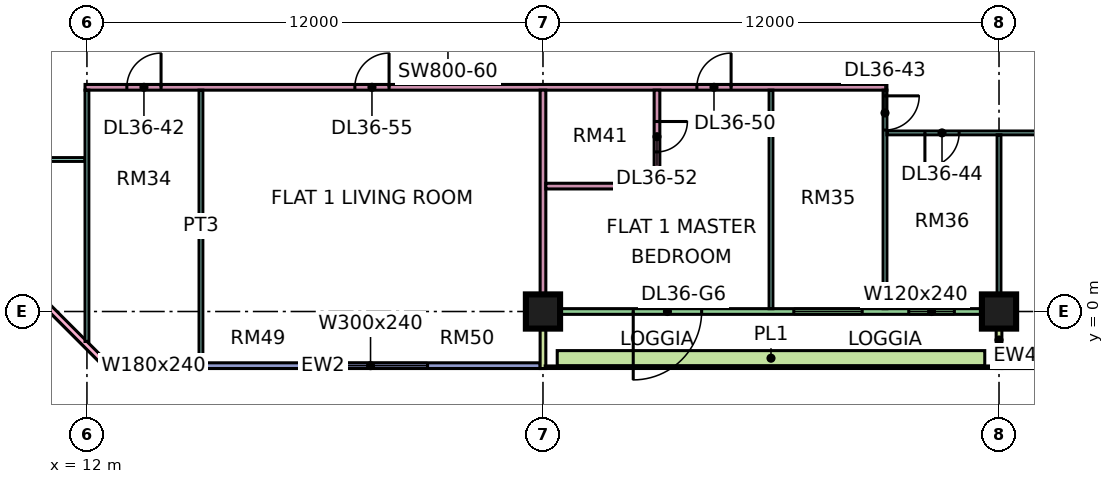
"""IFC4 building model, lengths in metres.
Left out: names, types, materials, properties, quantities, classifications, styles, units other than length and angle.
Written with IfcOpenShell. Run it as: python <this file> out.ifc"""

import sys

from ifc_helpers import new_model, si_unit, direction, frame, frame_2d, origin, origin_2d, place, context, subcontext, project, spatial, rectangle, extrude, element, fill, save


model = new_model("IFC4")
c1 = context("Model", 3, precision=1e-05, world=origin(), true_north=direction((0.0, 1.0)))
c2 = subcontext(c1, "Body", "Model", "MODEL_VIEW")
j1 = project(units=[si_unit("LENGTHUNIT", "METRE"), si_unit("PLANEANGLEUNIT", "RADIAN")], contexts=[c1])
p1 = place(None, origin())
s1 = spatial("IfcSite", under=j1, at=p1, CompositionType="ELEMENT")
p2 = place(p1, origin())
s2 = spatial("IfcBuilding", under=s1, at=p2, CompositionType="ELEMENT")
p3 = place(p2, frame((0.0, 0.0, 161.15)))
s3 = spatial("IfcBuildingStorey", under=s2, at=p3, CompositionType="ELEMENT", Elevation=161.15)
for number, where, z_axis, x_axis in (
    (1, (24.0, 0.0, 0.0), (0.0, 0.0, 1.0), (1.0, 0.0, 0.0)),
    (2, (36.0, 0.0, 0.0), (0.0, 0.0, 1.0), (1.0, 0.0, 0.0)),
):
    element("IfcColumn", number, at=place(p3, frame(where, z_axis=z_axis, x_axis=x_axis)), inside=s3, PredefinedType="COLUMN", context=c2, shape_type="SweptSolid", body=[
        extrude(rectangle(XDim=0.9, YDim=0.9, at=origin_2d()), origin(), (0.0, 0.0, 1.0), 3.75),
    ])
p4 = place(p3, frame((-1.447, 12.553, 0.0), z_axis=(0.0, 0.0, 1.0), x_axis=(0.707106781187, -0.707106781187, 0.0)))
e3 = element("IfcWall", 3, at=p4, inside=s3, PredefinedType="SOLIDWALL", context=c2, shape_type="SweptSolid", body=[
    extrude(rectangle(XDim=19.799, YDim=0.15, at=frame_2d((9.899, 0.0))), origin(), (0.0, 0.0, 1.0), 3.35),
])
p5 = place(p4, frame((2.212, 0.0, 0.45)))
e4 = element("IfcOpeningElement", 4, at=p5, cuts=e3, PredefinedType="OPENING", context=c2, shape_type="SweptSolid", body=[
    extrude(rectangle(XDim=3.0, YDim=2.4, at=frame_2d((1.5, 1.2))), frame((0.0, 0.085, 0.0), z_axis=(0.0, -1.0, 0.0), x_axis=(1.0, 0.0, 0.0)), (0.0, 0.0, 1.0), 0.17),
])
p6 = place(p4, frame((10.216, 0.0, 0.45)))
e5 = element("IfcOpeningElement", 5, at=p6, cuts=e3, PredefinedType="OPENING", context=c2, shape_type="SweptSolid", body=[
    extrude(rectangle(XDim=3.0, YDim=2.4, at=frame_2d((1.5, 1.2))), frame((0.0, 0.085, 0.0), z_axis=(0.0, -1.0, 0.0), x_axis=(1.0, 0.0, 0.0)), (0.0, 0.0, 1.0), 0.17),
])
p7 = place(p3, frame((12.5, -1.425, 0.0), z_axis=(0.0, 0.0, 1.0), x_axis=(1.0, 0.0, 0.0)))
e6 = element("IfcWall", 6, at=p7, inside=s3, PredefinedType="SOLIDWALL", context=c2, shape_type="SweptSolid", body=[
    extrude(rectangle(XDim=11.425, YDim=0.15, at=frame_2d((5.712, 0.0))), origin(), (0.0, 0.0, 1.0), 3.35),
])
p8 = place(p7, frame((0.35, 0.0, 0.45)))
e7 = element("IfcOpeningElement", 7, at=p8, cuts=e6, PredefinedType="OPENING", context=c2, shape_type="SweptSolid", body=[
    extrude(rectangle(XDim=1.8, YDim=2.4, at=frame_2d((0.9, 1.2))), frame((0.0, 0.085, 0.0), z_axis=(0.0, -1.0, 0.0), x_axis=(1.0, 0.0, 0.0)), (0.0, 0.0, 1.0), 0.17),
])
p9 = place(p7, frame((5.462, 0.0, 0.45)))
e8 = element("IfcOpeningElement", 8, at=p9, cuts=e6, PredefinedType="OPENING", context=c2, shape_type="SweptSolid", body=[
    extrude(rectangle(XDim=3.0, YDim=2.4, at=frame_2d((1.5, 1.2))), frame((0.0, 0.085, 0.0), z_axis=(0.0, -1.0, 0.0), x_axis=(1.0, 0.0, 0.0)), (0.0, 0.0, 1.0), 0.17),
])
p10 = place(p3, frame((24.075, 0.0, 0.0), z_axis=(0.0, 0.0, 1.0), x_axis=(1.0, 0.0, 0.0)))
e9 = element("IfcWall", 9, at=p10, inside=s3, PredefinedType="SOLIDWALL", context=c2, shape_type="SweptSolid", body=[
    extrude(rectangle(XDim=11.85, YDim=0.15, at=frame_2d((5.925, 0.0))), origin(), (0.0, 0.0, 1.0), 3.35),
])
p11 = place(p10, frame((2.3, 0.0, 0.0)))
e10 = element("IfcOpeningElement", 10, at=p11, cuts=e9, PredefinedType="OPENING", context=c2, shape_type="SweptSolid", body=[
    extrude(rectangle(XDim=1.8, YDim=2.4, at=frame_2d((0.9, 1.2))), frame((0.0, 0.085, 0.0), z_axis=(0.0, -1.0, 0.0), x_axis=(1.0, 0.0, 0.0)), (0.0, 0.0, 1.0), 0.17),
])
p12 = place(p10, frame((6.525, 0.0, 0.45)))
e11 = element("IfcOpeningElement", 11, at=p12, cuts=e9, PredefinedType="OPENING", context=c2, shape_type="SweptSolid", body=[
    extrude(rectangle(XDim=1.8, YDim=2.4, at=frame_2d((0.9, 1.2))), frame((0.0, 0.085, 0.0), z_axis=(0.0, -1.0, 0.0), x_axis=(1.0, 0.0, 0.0)), (0.0, 0.0, 1.0), 0.17),
])
p13 = place(p10, frame((9.55, 0.0, 0.45)))
e12 = element("IfcOpeningElement", 12, at=p13, cuts=e9, PredefinedType="OPENING", context=c2, shape_type="SweptSolid", body=[
    extrude(rectangle(XDim=1.2, YDim=2.4, at=frame_2d((0.6, 1.2))), frame((0.0, 0.085, 0.0), z_axis=(0.0, -1.0, 0.0), x_axis=(1.0, 0.0, 0.0)), (0.0, 0.0, 1.0), 0.17),
])
for number, where, z_axis, x_axis in (
    (13, (24.0, -1.5, 0.0), (0.0, 0.0, 1.0), (0.0, 1.0, 0.0)),
    (14, (36.0, -1.5, 0.0), (0.0, 0.0, 1.0), (0.0, 1.0, 0.0)),
):
    element("IfcWall", number, at=place(p3, frame(where, z_axis=z_axis, x_axis=x_axis)), inside=s3, PredefinedType="SOLIDWALL", context=c2, shape_type="SweptSolid", body=[
        extrude(rectangle(XDim=1.5, YDim=0.15, at=frame_2d((0.75, 0.0))), origin(), (0.0, 0.0, 1.0), 3.35),
    ])
p14 = place(p3, frame((36.075, -1.425, 0.0), z_axis=(0.0, 0.0, 1.0), x_axis=(1.0, 0.0, 0.0)))
e15 = element("IfcWall", 15, at=p14, inside=s3, PredefinedType="SOLIDWALL", context=c2, shape_type="SweptSolid", body=[
    extrude(rectangle(XDim=11.85, YDim=0.15, at=frame_2d((5.925, 0.0))), origin(), (0.0, 0.0, 1.0), 3.35),
])
p15 = place(p14, frame((2.962, 0.0, 0.45)))
e16 = element("IfcOpeningElement", 16, at=p15, cuts=e15, PredefinedType="OPENING", context=c2, shape_type="SweptSolid", body=[
    extrude(rectangle(XDim=3.0, YDim=2.4, at=frame_2d((1.5, 1.2))), frame((0.0, 0.085, 0.0), z_axis=(0.0, -1.0, 0.0), x_axis=(1.0, 0.0, 0.0)), (0.0, 0.0, 1.0), 0.17),
])
p16 = place(p14, frame((9.488, 0.0, 0.45)))
e17 = element("IfcOpeningElement", 17, at=p16, cuts=e15, PredefinedType="OPENING", context=c2, shape_type="SweptSolid", body=[
    extrude(rectangle(XDim=1.8, YDim=2.4, at=frame_2d((0.9, 1.2))), frame((0.0, 0.085, 0.0), z_axis=(0.0, -1.0, 0.0), x_axis=(1.0, 0.0, 0.0)), (0.0, 0.0, 1.0), 0.17),
])
p17 = place(p3, frame((24.375, -1.229, 0.0), z_axis=(0.0, 0.0, 1.0), x_axis=(1.0, 0.0, 0.0)))
e18 = element("IfcWall", 18, at=p17, inside=s3, PredefinedType="SOLIDWALL", context=c2, shape_type="SweptSolid", body=[
    extrude(rectangle(XDim=11.25, YDim=0.4, at=frame_2d((5.625, 0.0))), origin(), (0.0, 0.0, 1.0), 0.7),
])
p18 = place(p3, frame((9.05, 4.0, 0.0), z_axis=(0.0, 0.0, 1.0), x_axis=(1.0, 0.0, 0.0)))
e19 = element("IfcWall", 19, at=p18, inside=s3, PredefinedType="PARTITIONING", context=c2, shape_type="SweptSolid", body=[
    extrude(rectangle(XDim=2.9, YDim=0.1, at=frame_2d((1.45, 0.0))), origin(), (0.0, 0.0, 1.0), 3.35),
])
p19 = place(p3, frame((11.95, 5.9, 0.0), z_axis=(0.0, 0.0, 1.0), x_axis=(1.0, 0.0, 0.0)))
e20 = element("IfcWall", 20, at=p19, inside=s3, PredefinedType="PARTITIONING", context=c2, shape_type="SweptSolid", body=[
    extrude(rectangle(XDim=21.1, YDim=0.15, at=frame_2d((10.55, 0.0))), origin(), (0.0, 0.0, 1.0), 3.35),
])
p20 = place(p19, frame((1.1, 0.0, 0.0)))
e21 = element("IfcOpeningElement", 21, at=p20, cuts=e20, PredefinedType="OPENING", context=c2, shape_type="SweptSolid", body=[
    extrude(rectangle(XDim=0.9, YDim=2.1, at=frame_2d((0.45, 1.05))), frame((0.0, 0.085, 0.0), z_axis=(0.0, -1.0, 0.0), x_axis=(1.0, 0.0, 0.0)), (0.0, 0.0, 1.0), 0.17),
])
p21 = place(p19, frame((16.1, 0.0, 0.0)))
e22 = element("IfcOpeningElement", 22, at=p21, cuts=e20, PredefinedType="OPENING", context=c2, shape_type="SweptSolid", body=[
    extrude(rectangle(XDim=0.9, YDim=2.1, at=frame_2d((0.45, 1.05))), frame((0.0, 0.085, 0.0), z_axis=(0.0, -1.0, 0.0), x_axis=(1.0, 0.0, 0.0)), (0.0, 0.0, 1.0), 0.17),
])
p22 = place(p19, frame((7.1, 0.0, 0.0)))
e23 = element("IfcOpeningElement", 23, at=p22, cuts=e20, PredefinedType="OPENING", context=c2, shape_type="SweptSolid", body=[
    extrude(rectangle(XDim=0.9, YDim=2.1, at=frame_2d((0.45, 1.05))), frame((0.0, 0.085, 0.0), z_axis=(0.0, -1.0, 0.0), x_axis=(1.0, 0.0, 0.0)), (0.0, 0.0, 1.0), 0.17),
])
p23 = place(p3, frame((12.0, -0.788, 0.0), z_axis=(0.0, 0.0, 1.0), x_axis=(0.0, 1.0, 0.0)))
e24 = element("IfcWall", 24, at=p23, inside=s3, PredefinedType="PARTITIONING", context=c2, shape_type="SweptSolid", body=[
    extrude(rectangle(XDim=6.613, YDim=0.1, at=frame_2d((3.306, 0.0))), origin(), (0.0, 0.0, 1.0), 3.35),
])
p24 = place(p3, frame((15.0, -1.35, 0.0), z_axis=(0.0, 0.0, 1.0), x_axis=(0.0, 1.0, 0.0)))
e25 = element("IfcWall", 25, at=p24, inside=s3, PredefinedType="PARTITIONING", context=c2, shape_type="SweptSolid", body=[
    extrude(rectangle(XDim=7.175, YDim=0.1, at=frame_2d((3.587, 0.0))), origin(), (0.0, 0.0, 1.0), 3.35),
])
p25 = place(p3, frame((24.0, 0.0, 0.0), z_axis=(0.0, 0.0, 1.0), x_axis=(0.0, 1.0, 0.0)))
e26 = element("IfcWall", 26, at=p25, inside=s3, PredefinedType="PARTITIONING", context=c2, shape_type="SweptSolid", body=[
    extrude(rectangle(XDim=5.825, YDim=0.15, at=frame_2d((2.913, 0.0))), origin(), (0.0, 0.0, 1.0), 3.35),
])
p26 = place(p3, frame((24.075, 3.3, 0.0), z_axis=(0.0, 0.0, 1.0), x_axis=(1.0, 0.0, 0.0)))
e27 = element("IfcWall", 27, at=p26, inside=s3, PredefinedType="PARTITIONING", context=c2, shape_type="SweptSolid", body=[
    extrude(rectangle(XDim=3.0, YDim=0.15, at=frame_2d((1.5, 0.0))), origin(), (0.0, 0.0, 1.0), 3.35),
])
p27 = place(p3, frame((27.0, 3.375, 0.0), z_axis=(0.0, 0.0, 1.0), x_axis=(0.0, 1.0, 0.0)))
e28 = element("IfcWall", 28, at=p27, inside=s3, PredefinedType="PARTITIONING", context=c2, shape_type="SweptSolid", body=[
    extrude(rectangle(XDim=2.45, YDim=0.15, at=frame_2d((1.225, 0.0))), origin(), (0.0, 0.0, 1.0), 3.35),
])
p28 = place(p27, frame((0.825, 0.0, 0.0)))
e29 = element("IfcOpeningElement", 29, at=p28, cuts=e28, PredefinedType="OPENING", context=c2, shape_type="SweptSolid", body=[
    extrude(rectangle(XDim=0.8, YDim=2.1, at=frame_2d((0.4, 1.05))), frame((0.0, 0.085, 0.0), z_axis=(0.0, -1.0, 0.0), x_axis=(1.0, 0.0, 0.0)), (0.0, 0.0, 1.0), 0.17),
])
p29 = place(p3, frame((30.0, 0.074, 0.0), z_axis=(0.0, 0.0, 1.0), x_axis=(0.0, 1.0, 0.0)))
e30 = element("IfcWall", 30, at=p29, inside=s3, PredefinedType="PARTITIONING", context=c2, shape_type="SweptSolid", body=[
    extrude(rectangle(XDim=5.751, YDim=0.1, at=frame_2d((2.875, 0.0))), origin(), (0.0, 0.0, 1.0), 3.35),
])
p30 = place(p3, frame((33.0, 0.074, 0.0), z_axis=(0.0, 0.0, 1.0), x_axis=(0.0, 1.0, 0.0)))
e31 = element("IfcWall", 31, at=p30, inside=s3, PredefinedType="PARTITIONING", context=c2, shape_type="SweptSolid", body=[
    extrude(rectangle(XDim=5.751, YDim=0.1, at=frame_2d((2.875, 0.0))), origin(), (0.0, 0.0, 1.0), 3.35),
])
p31 = place(p30, frame((4.701, 0.0, 0.0)))
e32 = element("IfcOpeningElement", 32, at=p31, cuts=e31, PredefinedType="OPENING", context=c2, shape_type="SweptSolid", body=[
    extrude(rectangle(XDim=0.9, YDim=2.1, at=frame_2d((0.45, 1.05))), frame((0.0, 0.06, 0.0), z_axis=(0.0, -1.0, 0.0), x_axis=(1.0, 0.0, 0.0)), (0.0, 0.0, 1.0), 0.12),
])
p32 = place(p3, frame((33.05, 4.7, 0.0), z_axis=(0.0, 0.0, 1.0), x_axis=(1.0, 0.0, 0.0)))
e33 = element("IfcWall", 33, at=p32, inside=s3, PredefinedType="PARTITIONING", context=c2, shape_type="SweptSolid", body=[
    extrude(rectangle(XDim=20.85, YDim=0.1, at=frame_2d((10.425, 0.0))), origin(), (0.0, 0.0, 1.0), 3.35),
])
p33 = place(p32, frame((1.0, 0.0, 0.0)))
e34 = element("IfcOpeningElement", 34, at=p33, cuts=e33, PredefinedType="OPENING", context=c2, shape_type="SweptSolid", body=[
    extrude(rectangle(XDim=0.9, YDim=2.1, at=frame_2d((0.45, 1.05))), frame((0.0, 0.06, 0.0), z_axis=(0.0, -1.0, 0.0), x_axis=(1.0, 0.0, 0.0)), (0.0, 0.0, 1.0), 0.12),
])
p34 = place(p32, frame((13.0, 0.0, 0.0)))
e35 = element("IfcOpeningElement", 35, at=p34, cuts=e33, PredefinedType="OPENING", context=c2, shape_type="SweptSolid", body=[
    extrude(rectangle(XDim=0.9, YDim=2.1, at=frame_2d((0.45, 1.05))), frame((0.0, 0.06, 0.0), z_axis=(0.0, -1.0, 0.0), x_axis=(1.0, 0.0, 0.0)), (0.0, 0.0, 1.0), 0.12),
])
p35 = place(p32, frame((16.0, 0.0, 0.0)))
e36 = element("IfcOpeningElement", 36, at=p35, cuts=e33, PredefinedType="OPENING", context=c2, shape_type="SweptSolid", body=[
    extrude(rectangle(XDim=0.9, YDim=2.1, at=frame_2d((0.45, 1.05))), frame((0.0, 0.06, 0.0), z_axis=(0.0, -1.0, 0.0), x_axis=(1.0, 0.0, 0.0)), (0.0, 0.0, 1.0), 0.12),
])
p36 = place(p32, frame((19.0, 0.0, 0.0)))
e37 = element("IfcOpeningElement", 37, at=p36, cuts=e33, PredefinedType="OPENING", context=c2, shape_type="SweptSolid", body=[
    extrude(rectangle(XDim=0.9, YDim=2.1, at=frame_2d((0.45, 1.05))), frame((0.0, 0.06, 0.0), z_axis=(0.0, -1.0, 0.0), x_axis=(1.0, 0.0, 0.0)), (0.0, 0.0, 1.0), 0.12),
])
p37 = place(p32, frame((7.0, 0.0, 0.0)))
e38 = element("IfcOpeningElement", 38, at=p37, cuts=e33, PredefinedType="OPENING", context=c2, shape_type="SweptSolid", body=[
    extrude(rectangle(XDim=0.9, YDim=2.1, at=frame_2d((0.45, 1.05))), frame((0.0, 0.06, 0.0), z_axis=(0.0, -1.0, 0.0), x_axis=(1.0, 0.0, 0.0)), (0.0, 0.0, 1.0), 0.12),
])
p38 = place(p3, frame((36.0, 0.0, 0.0), z_axis=(0.0, 0.0, 1.0), x_axis=(0.0, 1.0, 0.0)))
e39 = element("IfcWall", 39, at=p38, inside=s3, PredefinedType="PARTITIONING", context=c2, shape_type="SweptSolid", body=[
    extrude(rectangle(XDim=4.65, YDim=0.1, at=frame_2d((2.325, 0.0))), origin(), (0.0, 0.0, 1.0), 3.35),
])
p39 = place(p8, origin())
e40 = element("IfcWindow", 40, at=p39, inside=s3, PartitioningType="SINGLE_PANEL", PredefinedType="WINDOW", context=c2, shape_type="SweptSolid", body=[
    extrude(rectangle(XDim=1.8, YDim=2.4, at=frame_2d((0.9, 1.2))), frame((0.0, 0.03, 0.0), z_axis=(0.0, -1.0, 0.0), x_axis=(1.0, 0.0, 0.0)), (0.0, 0.0, 1.0), 0.06),
])
fill(e7, e40)
p40 = place(p9, origin())
e41 = element("IfcWindow", 41, at=p40, inside=s3, PartitioningType="SINGLE_PANEL", PredefinedType="WINDOW", context=c2, shape_type="SweptSolid", body=[
    extrude(rectangle(XDim=3.0, YDim=2.4, at=frame_2d((1.5, 1.2))), frame((0.0, 0.03, 0.0), z_axis=(0.0, -1.0, 0.0), x_axis=(1.0, 0.0, 0.0)), (0.0, 0.0, 1.0), 0.06),
])
fill(e8, e41)
p41 = place(p11, frame((1.8, 0.0, 0.0), z_axis=(0.0, 0.0, 1.0), x_axis=(-1.0, 0.0, 0.0)))
e42 = element("IfcDoor", 42, at=p41, inside=s3, OperationType="DOUBLE_DOOR_SINGLE_SWING", PredefinedType="DOOR", context=c2, shape_type="SweptSolid", body=[
    extrude(rectangle(XDim=1.8, YDim=2.4, at=frame_2d((0.9, 1.2))), frame((0.0, 0.025, 0.0), z_axis=(0.0, -1.0, 0.0), x_axis=(1.0, 0.0, 0.0)), (0.0, 0.0, 1.0), 0.05),
])
fill(e10, e42)
p42 = place(p12, origin())
e43 = element("IfcWindow", 43, at=p42, inside=s3, PartitioningType="SINGLE_PANEL", PredefinedType="WINDOW", context=c2, shape_type="SweptSolid", body=[
    extrude(rectangle(XDim=1.8, YDim=2.4, at=frame_2d((0.9, 1.2))), frame((0.0, 0.03, 0.0), z_axis=(0.0, -1.0, 0.0), x_axis=(1.0, 0.0, 0.0)), (0.0, 0.0, 1.0), 0.06),
])
fill(e11, e43)
p43 = place(p13, origin())
e44 = element("IfcWindow", 44, at=p43, inside=s3, PartitioningType="SINGLE_PANEL", PredefinedType="WINDOW", context=c2, shape_type="SweptSolid", body=[
    extrude(rectangle(XDim=1.2, YDim=2.4, at=frame_2d((0.6, 1.2))), frame((0.0, 0.03, 0.0), z_axis=(0.0, -1.0, 0.0), x_axis=(1.0, 0.0, 0.0)), (0.0, 0.0, 1.0), 0.06),
])
fill(e12, e44)
p44 = place(p20, frame((0.9, 0.0, 0.0), z_axis=(0.0, 0.0, 1.0), x_axis=(-1.0, 0.0, 0.0)))
e45 = element("IfcDoor", 45, at=p44, inside=s3, OperationType="SINGLE_SWING_RIGHT", PredefinedType="DOOR", context=c2, shape_type="SweptSolid", body=[
    extrude(rectangle(XDim=0.9, YDim=2.1, at=frame_2d((0.45, 1.05))), frame((0.0, 0.025, 0.0), z_axis=(0.0, -1.0, 0.0), x_axis=(1.0, 0.0, 0.0)), (0.0, 0.0, 1.0), 0.05),
])
fill(e21, e45)
p45 = place(p31, origin())
e46 = element("IfcDoor", 46, at=p45, inside=s3, OperationType="SINGLE_SWING_RIGHT", PredefinedType="DOOR", context=c2, shape_type="SweptSolid", body=[
    extrude(rectangle(XDim=0.9, YDim=2.1, at=frame_2d((0.45, 1.05))), frame((0.0, 0.025, 0.0), z_axis=(0.0, -1.0, 0.0), x_axis=(1.0, 0.0, 0.0)), (0.0, 0.0, 1.0), 0.05),
])
fill(e32, e46)
p46 = place(p33, frame((0.9, 0.0, 0.0), z_axis=(0.0, 0.0, 1.0), x_axis=(-1.0, 0.0, 0.0)))
e47 = element("IfcDoor", 47, at=p46, inside=s3, OperationType="SINGLE_SWING_LEFT", PredefinedType="DOOR", context=c2, shape_type="SweptSolid", body=[
    extrude(rectangle(XDim=0.9, YDim=2.1, at=frame_2d((0.45, 1.05))), frame((0.0, 0.025, 0.0), z_axis=(0.0, -1.0, 0.0), x_axis=(1.0, 0.0, 0.0)), (0.0, 0.0, 1.0), 0.05),
])
fill(e34, e47)
p47 = place(p21, frame((0.9, 0.0, 0.0), z_axis=(0.0, 0.0, 1.0), x_axis=(-1.0, 0.0, 0.0)))
e48 = element("IfcDoor", 48, at=p47, inside=s3, OperationType="SINGLE_SWING_RIGHT", PredefinedType="DOOR", context=c2, shape_type="SweptSolid", body=[
    extrude(rectangle(XDim=0.9, YDim=2.1, at=frame_2d((0.45, 1.05))), frame((0.0, 0.025, 0.0), z_axis=(0.0, -1.0, 0.0), x_axis=(1.0, 0.0, 0.0)), (0.0, 0.0, 1.0), 0.05),
])
fill(e22, e48)
p48 = place(p28, origin())
e49 = element("IfcDoor", 49, at=p48, inside=s3, OperationType="SINGLE_SWING_RIGHT", PredefinedType="DOOR", context=c2, shape_type="SweptSolid", body=[
    extrude(rectangle(XDim=0.8, YDim=2.1, at=frame_2d((0.4, 1.05))), frame((0.0, 0.025, 0.0), z_axis=(0.0, -1.0, 0.0), x_axis=(1.0, 0.0, 0.0)), (0.0, 0.0, 1.0), 0.05),
])
fill(e29, e49)
p49 = place(p22, frame((0.9, 0.0, 0.0), z_axis=(0.0, 0.0, 1.0), x_axis=(-1.0, 0.0, 0.0)))
e50 = element("IfcDoor", 50, at=p49, inside=s3, OperationType="SINGLE_SWING_RIGHT", PredefinedType="DOOR", context=c2, shape_type="SweptSolid", body=[
    extrude(rectangle(XDim=0.9, YDim=2.1, at=frame_2d((0.45, 1.05))), frame((0.0, 0.025, 0.0), z_axis=(0.0, -1.0, 0.0), x_axis=(1.0, 0.0, 0.0)), (0.0, 0.0, 1.0), 0.05),
])
fill(e23, e50)
save(model, sys.argv[1])
